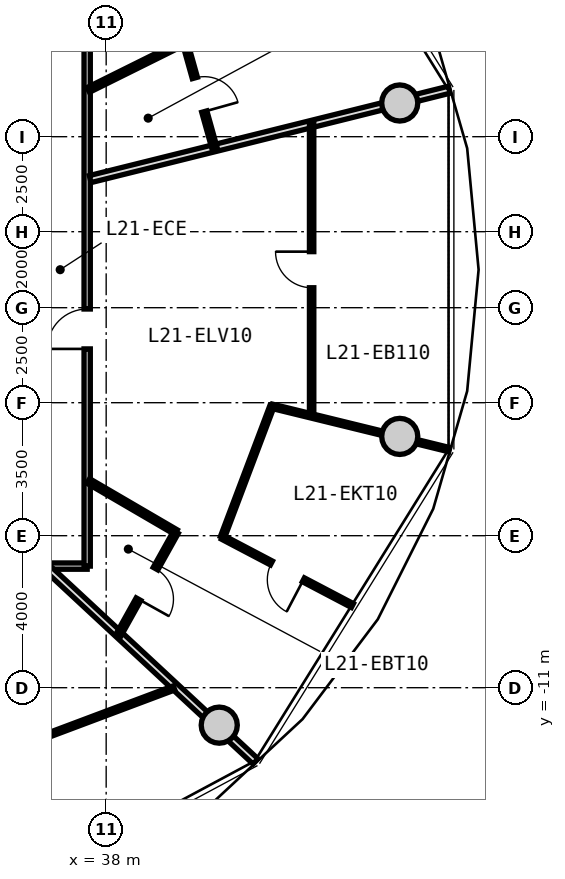
"""IFC4 building model, lengths in metres.
Left out: names, types, materials, properties, quantities, classifications, styles, units other than length and angle.
Written with IfcOpenShell. Run it as: python <this file> out.ifc"""

import sys

from ifc_helpers import new_model, si_unit, direction, frame, frame_2d, origin, origin_2d, place, context, subcontext, project, spatial, rectangle, circle, extrude, source, transform, mapped, element, fill, save


model = new_model("IFC4")
c1 = context("Model", 3, precision=1e-05, world=origin(), true_north=direction((0.0, 1.0)))
c2 = subcontext(c1, "Body", "Model", "MODEL_VIEW")
j1 = project(units=[si_unit("LENGTHUNIT", "METRE"), si_unit("PLANEANGLEUNIT", "RADIAN")], contexts=[c1])
p1 = place(None, origin())
s1 = spatial("IfcSite", under=j1, at=p1, CompositionType="ELEMENT")
p2 = place(p1, origin())
s2 = spatial("IfcBuilding", under=s1, at=p2, CompositionType="ELEMENT")
p3 = place(p2, frame((0.0, 0.0, 70.4)))
s3 = spatial("IfcBuildingStorey", under=s2, at=p3, CompositionType="ELEMENT", Elevation=70.4)
m1 = source(origin(), c2, "Body", "SweptSolid", [
    extrude(circle(Radius=0.475, at=origin_2d()), origin(), (0.0, 0.0, 1.0), 3.05),
])
for number, where, z_axis, x_axis in (
    (1, (45.725, 4.387, 0.0), (0.0, 0.0, 1.0), (1.0, 0.0, 0.0)),
    (2, (40.975, -11.985, 0.0), (0.0, 0.0, 1.0), (1.0, 0.0, 0.0)),
    (3, (45.725, -4.387, 0.0), (0.0, 0.0, 1.0), (1.0, 0.0, 0.0)),
):
    element("IfcColumn", number, at=place(p3, frame(where, z_axis=z_axis, x_axis=x_axis)), inside=s3, PredefinedType="COLUMN", context=c2, shape_type="MappedRepresentation", body=[
        mapped(m1, transform((0.0, 0.0, 0.0), x_axis=(1.0, 0.0, 0.0), y_axis=(0.0, 1.0, 0.0), z_axis=(0.0, 0.0, 1.0), scale=1.0)),
    ])
m2 = source(origin(), c2, "Body", "SweptSolid", [
    extrude(rectangle(XDim=19.0, YDim=0.165, at=frame_2d((9.5, 0.0))), origin(), (0.0, 0.0, 1.0), 2.715),
])
p4 = place(p3, frame((37.5, -7.8, 0.0), z_axis=(0.0, 0.0, 1.0), x_axis=(-1.0, 0.0, 0.0)))
e4 = element("IfcWall", 4, at=p4, inside=s3, PredefinedType="PARTITIONING", context=c2, shape_type="MappedRepresentation", body=[
    mapped(m2, transform((0.0, 0.0, 0.0), x_axis=(1.0, 0.0, 0.0), y_axis=(0.0, 1.0, 0.0), z_axis=(0.0, 0.0, 1.0), scale=1.0)),
])
p5 = place(p4, frame((14.72, 0.0, 0.0)))
e5 = element("IfcOpeningElement", 5, at=p5, cuts=e4, PredefinedType="OPENING", context=c2, shape_type="SweptSolid", body=[
    extrude(rectangle(XDim=1.05, YDim=2.15, at=frame_2d((0.525, 1.075))), frame((0.0, 0.093, 0.0), z_axis=(0.0, -1.0, 0.0), x_axis=(1.0, 0.0, 0.0)), (0.0, 0.0, 1.0), 0.185),
])
p6 = place(p4, frame((4.847, 0.0, 0.0)))
e6 = element("IfcOpeningElement", 6, at=p6, cuts=e4, PredefinedType="OPENING", context=c2, shape_type="SweptSolid", body=[
    extrude(rectangle(XDim=1.05, YDim=2.15, at=frame_2d((0.525, 1.075))), frame((0.0, 0.093, 0.0), z_axis=(0.0, -1.0, 0.0), x_axis=(1.0, 0.0, 0.0)), (0.0, 0.0, 1.0), 0.185),
])
m3 = source(origin(), c2, "Body", "SweptSolid", [
    extrude(rectangle(XDim=15.6, YDim=0.165, at=frame_2d((7.8, 0.0))), origin(), (0.0, 0.0, 1.0), 2.715),
])
p7 = place(p3, frame((37.5, 7.8, 0.0), z_axis=(0.0, 0.0, 1.0), x_axis=(0.0, -1.0, 0.0)))
e7 = element("IfcWall", 7, at=p7, inside=s3, PredefinedType="PARTITIONING", context=c2, shape_type="MappedRepresentation", body=[
    mapped(m3, transform((0.0, 0.0, 0.0), x_axis=(1.0, 0.0, 0.0), y_axis=(0.0, 1.0, 0.0), z_axis=(0.0, 0.0, 1.0), scale=1.0)),
])
p8 = place(p7, frame((8.835, 0.0, 0.0)))
e8 = element("IfcOpeningElement", 8, at=p8, cuts=e7, PredefinedType="OPENING", context=c2, shape_type="SweptSolid", body=[
    extrude(rectangle(XDim=1.05, YDim=2.15, at=frame_2d((0.525, 1.075))), frame((0.0, 0.093, 0.0), z_axis=(0.0, -1.0, 0.0), x_axis=(1.0, 0.0, 0.0)), (0.0, 0.0, 1.0), 0.185),
])
m4 = source(origin(), c2, "Body", "SweptSolid", [
    extrude(rectangle(XDim=7.435, YDim=0.19, at=frame_2d((3.717, 0.0))), origin(), (0.0, 0.0, 1.0), 2.165),
])
p9 = place(p3, frame((36.483, -7.88, 0.0), z_axis=(0.0, 0.0, 1.0), x_axis=(0.732651956848, -0.680603489652, 0.0)))
e9 = element("IfcWall", 9, at=p9, inside=s3, PredefinedType="PARTITIONING", context=c2, shape_type="MappedRepresentation", body=[
    mapped(m4, transform((0.0, 0.0, 0.0), x_axis=(1.0, 0.0, 0.0), y_axis=(0.0, 1.0, 0.0), z_axis=(0.0, 0.0, 1.0), scale=1.0)),
])
m5 = source(origin(), c2, "Body", "SweptSolid", [
    extrude(rectangle(XDim=8.32, YDim=0.115, at=frame_2d((4.16, 0.0))), origin(), (0.0, 0.0, 1.0), 2.715),
])
p10 = place(p3, frame((31.997, -13.93, 0.0), z_axis=(0.0, 0.0, 1.0), x_axis=(0.936180763098, 0.351518959382, 0.0)))
e10 = element("IfcWall", 10, at=p10, inside=s3, PredefinedType="PARTITIONING", context=c2, shape_type="MappedRepresentation", body=[
    mapped(m5, transform((0.0, 0.0, 0.0), x_axis=(1.0, 0.0, 0.0), y_axis=(0.0, 1.0, 0.0), z_axis=(0.0, 0.0, 1.0), scale=1.0)),
])
p11 = place(p10, frame((3.685, 0.0, 0.0)))
e11 = element("IfcOpeningElement", 11, at=p11, cuts=e10, PredefinedType="OPENING", context=c2, shape_type="SweptSolid", body=[
    extrude(rectangle(XDim=0.95, YDim=2.1, at=frame_2d((0.475, 1.05))), frame((0.0, 0.067, 0.0), z_axis=(0.0, -1.0, 0.0), x_axis=(1.0, 0.0, 0.0)), (0.0, 0.0, 1.0), 0.135),
])
m6 = source(origin(), c2, "Body", "SweptSolid", [
    extrude(rectangle(XDim=9.737, YDim=0.19, at=frame_2d((4.869, 0.0))), origin(), (0.0, 0.0, 1.0), 2.165),
])
p12 = place(p3, frame((37.58, 2.385, 0.0), z_axis=(0.0, 0.0, 1.0), x_axis=(0.970392716238, 0.241532557375, 0.0)))
e12 = element("IfcWall", 12, at=p12, inside=s3, PredefinedType="PARTITIONING", context=c2, shape_type="MappedRepresentation", body=[
    mapped(m6, transform((0.0, 0.0, 0.0), x_axis=(1.0, 0.0, 0.0), y_axis=(0.0, 1.0, 0.0), z_axis=(0.0, 0.0, 1.0), scale=1.0)),
])
m7 = source(origin(), c2, "Body", "SweptSolid", [
    extrude(rectangle(XDim=7.709, YDim=0.115, at=frame_2d((3.855, 0.0))), origin(), (0.0, 0.0, 1.0), 2.715),
])
p13 = place(p3, frame((43.406, -3.855, 0.0), z_axis=(0.0, 0.0, 1.0), x_axis=(0.0, 1.0, 0.0)))
e13 = element("IfcWall", 13, at=p13, inside=s3, PredefinedType="PARTITIONING", context=c2, shape_type="MappedRepresentation", body=[
    mapped(m7, transform((0.0, 0.0, 0.0), x_axis=(1.0, 0.0, 0.0), y_axis=(0.0, 1.0, 0.0), z_axis=(0.0, 0.0, 1.0), scale=1.0)),
])
p14 = place(p13, frame((3.38, 0.0, 0.0)))
e14 = element("IfcOpeningElement", 14, at=p14, cuts=e13, PredefinedType="OPENING", context=c2, shape_type="SweptSolid", body=[
    extrude(rectangle(XDim=0.95, YDim=2.1, at=frame_2d((0.475, 1.05))), frame((0.0, 0.067, 0.0), z_axis=(0.0, -1.0, 0.0), x_axis=(1.0, 0.0, 0.0)), (0.0, 0.0, 1.0), 0.135),
])
m8 = source(origin(), c2, "Body", "SweptSolid", [
    extrude(rectangle(XDim=4.803, YDim=0.115, at=frame_2d((2.401, 0.0))), origin(), (0.0, 0.0, 1.0), 2.165),
])
p15 = place(p3, frame((42.364, -3.594, 0.0), z_axis=(0.0, 0.0, 1.0), x_axis=(0.97129155908, -0.237892217736, 0.0)))
e15 = element("IfcWall", 15, at=p15, inside=s3, PredefinedType="PARTITIONING", context=c2, shape_type="MappedRepresentation", body=[
    mapped(m8, transform((0.0, 0.0, 0.0), x_axis=(1.0, 0.0, 0.0), y_axis=(0.0, 1.0, 0.0), z_axis=(0.0, 0.0, 1.0), scale=1.0)),
])
m9 = source(origin(), c2, "Body", "SweptSolid", [
    extrude(rectangle(XDim=2.669, YDim=0.14, at=frame_2d((1.335, 0.0))), origin(), (0.0, 0.0, 1.0), 2.715),
])
p16 = place(p3, frame((37.53, -5.561, 0.0), z_axis=(0.0, 0.0, 1.0), x_axis=(0.86369928178, -0.50400749067, 0.0)))
e16 = element("IfcWall", 16, at=p16, inside=s3, PredefinedType="PARTITIONING", context=c2, shape_type="MappedRepresentation", body=[
    mapped(m9, transform((0.0, 0.0, 0.0), x_axis=(1.0, 0.0, 0.0), y_axis=(0.0, 1.0, 0.0), z_axis=(0.0, 0.0, 1.0), scale=1.0)),
])
m10 = source(origin(), c2, "Body", "SweptSolid", [
    extrude(rectangle(XDim=3.121, YDim=0.14, at=frame_2d((1.561, 0.0))), origin(), (0.0, 0.0, 1.0), 2.715),
])
p17 = place(p3, frame((39.836, -6.906, 0.0), z_axis=(0.0, 0.0, 1.0), x_axis=(-0.487302357327, -0.873233309342, 0.0)))
e17 = element("IfcWall", 17, at=p17, inside=s3, PredefinedType="PARTITIONING", context=c2, shape_type="MappedRepresentation", body=[
    mapped(m10, transform((0.0, 0.0, 0.0), x_axis=(1.0, 0.0, 0.0), y_axis=(0.0, 1.0, 0.0), z_axis=(0.0, 0.0, 1.0), scale=1.0)),
])
p18 = place(p17, frame((1.101, 0.0, 0.0)))
e18 = element("IfcOpeningElement", 18, at=p18, cuts=e17, PredefinedType="OPENING", context=c2, shape_type="SweptSolid", body=[
    extrude(rectangle(XDim=0.92, YDim=2.1, at=frame_2d((0.46, 1.05))), frame((0.0, 0.08, 0.0), z_axis=(0.0, -1.0, 0.0), x_axis=(1.0, 0.0, 0.0)), (0.0, 0.0, 1.0), 0.16),
])
m11 = source(origin(), c2, "Body", "SweptSolid", [
    extrude(rectangle(XDim=3.864, YDim=0.115, at=frame_2d((1.932, 0.0))), origin(), (0.0, 0.0, 1.0), 2.715),
])
p19 = place(p3, frame((41.06, -7.041, 0.0), z_axis=(0.0, 0.0, 1.0), x_axis=(0.885194959803, -0.465220252289, 0.0)))
e19 = element("IfcWall", 19, at=p19, inside=s3, PredefinedType="PARTITIONING", context=c2, shape_type="MappedRepresentation", body=[
    mapped(m11, transform((0.0, 0.0, 0.0), x_axis=(1.0, 0.0, 0.0), y_axis=(0.0, 1.0, 0.0), z_axis=(0.0, 0.0, 1.0), scale=1.0)),
])
p20 = place(p19, frame((1.457, 0.0, 0.0)))
e20 = element("IfcOpeningElement", 20, at=p20, cuts=e19, PredefinedType="OPENING", context=c2, shape_type="SweptSolid", body=[
    extrude(rectangle(XDim=0.95, YDim=2.1, at=frame_2d((0.475, 1.05))), frame((0.0, 0.067, 0.0), z_axis=(0.0, -1.0, 0.0), x_axis=(1.0, 0.0, 0.0)), (0.0, 0.0, 1.0), 0.135),
])
m12 = source(origin(), c2, "Body", "SweptSolid", [
    extrude(rectangle(XDim=3.685, YDim=0.115, at=frame_2d((1.843, 0.0))), origin(), (0.0, 0.0, 1.0), 2.715),
])
p21 = place(p3, frame((41.06, -7.041, 0.0), z_axis=(0.0, 0.0, 1.0), x_axis=(0.353503632997, 0.935433151785, 0.0)))
e21 = element("IfcWall", 21, at=p21, inside=s3, PredefinedType="PARTITIONING", context=c2, shape_type="MappedRepresentation", body=[
    mapped(m12, transform((0.0, 0.0, 0.0), x_axis=(1.0, 0.0, 0.0), y_axis=(0.0, 1.0, 0.0), z_axis=(0.0, 0.0, 1.0), scale=1.0)),
])
m13 = source(origin(), c2, "Body", "SweptSolid", [
    extrude(rectangle(XDim=2.834, YDim=0.14, at=frame_2d((1.417, 0.0))), origin(), (0.0, 0.0, 1.0), 2.715),
])
p22 = place(p3, frame((37.53, 4.732, 0.0), z_axis=(0.0, 0.0, 1.0), x_axis=(0.895681174462, 0.444696788513, 0.0)))
e22 = element("IfcWall", 22, at=p22, inside=s3, PredefinedType="PARTITIONING", context=c2, shape_type="MappedRepresentation", body=[
    mapped(m13, transform((0.0, 0.0, 0.0), x_axis=(1.0, 0.0, 0.0), y_axis=(0.0, 1.0, 0.0), z_axis=(0.0, 0.0, 1.0), scale=1.0)),
])
m14 = source(origin(), c2, "Body", "SweptSolid", [
    extrude(rectangle(XDim=2.885, YDim=0.14, at=frame_2d((1.442, 0.0))), origin(), (0.0, 0.0, 1.0), 2.715),
])
p23 = place(p3, frame((40.069, 5.992, 0.0), z_axis=(0.0, 0.0, 1.0), x_axis=(0.269799431837, -0.962916541856, 0.0)))
e23 = element("IfcWall", 23, at=p23, inside=s3, PredefinedType="PARTITIONING", context=c2, shape_type="MappedRepresentation", body=[
    mapped(m14, transform((0.0, 0.0, 0.0), x_axis=(1.0, 0.0, 0.0), y_axis=(0.0, 1.0, 0.0), z_axis=(0.0, 0.0, 1.0), scale=1.0)),
])
p24 = place(p23, frame((0.982, 0.0, 0.0)))
e24 = element("IfcOpeningElement", 24, at=p24, cuts=e23, PredefinedType="OPENING", context=c2, shape_type="SweptSolid", body=[
    extrude(rectangle(XDim=0.92, YDim=2.1, at=frame_2d((0.46, 1.05))), frame((0.0, 0.08, 0.0), z_axis=(0.0, -1.0, 0.0), x_axis=(1.0, 0.0, 0.0)), (0.0, 0.0, 1.0), 0.16),
])
m15 = source(origin(), c2, "Body", "SweptSolid", [
    extrude(rectangle(XDim=1.05, YDim=2.15, at=frame_2d((0.525, 1.075))), frame((0.0, 0.025, 0.0), z_axis=(0.0, -1.0, 0.0), x_axis=(1.0, 0.0, 0.0)), (0.0, 0.0, 1.0), 0.05),
])
p25 = place(p8, frame((1.05, 0.0, 0.0), z_axis=(0.0, 0.0, 1.0), x_axis=(-1.0, 0.0, 0.0)))
e25 = element("IfcDoor", 25, at=p25, inside=s3, OperationType="SINGLE_SWING_LEFT", PredefinedType="DOOR", context=c2, shape_type="MappedRepresentation", body=[
    mapped(m15, transform((0.0, 0.0, 0.0), x_axis=(1.0, 0.0, 0.0), y_axis=(0.0, 1.0, 0.0), z_axis=(0.0, 0.0, 1.0), scale=1.0)),
])
fill(e8, e25)
m16 = source(origin(), c2, "Body", "SweptSolid", [
    extrude(rectangle(XDim=0.92, YDim=2.1, at=frame_2d((0.46, 1.05))), frame((0.0, 0.025, 0.0), z_axis=(0.0, -1.0, 0.0), x_axis=(1.0, 0.0, 0.0)), (0.0, 0.0, 1.0), 0.05),
])
p26 = place(p18, origin())
e26 = element("IfcDoor", 26, at=p26, inside=s3, OperationType="SINGLE_SWING_RIGHT", PredefinedType="DOOR", context=c2, shape_type="MappedRepresentation", body=[
    mapped(m16, transform((0.0, 0.0, 0.0), x_axis=(1.0, 0.0, 0.0), y_axis=(0.0, 1.0, 0.0), z_axis=(0.0, 0.0, 1.0), scale=1.0)),
])
fill(e18, e26)
m17 = source(origin(), c2, "Body", "SweptSolid", [
    extrude(rectangle(XDim=0.95, YDim=2.1, at=frame_2d((0.475, 1.05))), frame((0.0, 0.025, 0.0), z_axis=(0.0, -1.0, 0.0), x_axis=(1.0, 0.0, 0.0)), (0.0, 0.0, 1.0), 0.05),
])
p27 = place(p20, frame((0.95, 0.0, 0.0), z_axis=(0.0, 0.0, 1.0), x_axis=(-1.0, 0.0, 0.0)))
e27 = element("IfcDoor", 27, at=p27, inside=s3, OperationType="SINGLE_SWING_LEFT", PredefinedType="DOOR", context=c2, shape_type="MappedRepresentation", body=[
    mapped(m17, transform((0.0, 0.0, 0.0), x_axis=(1.0, 0.0, 0.0), y_axis=(0.0, 1.0, 0.0), z_axis=(0.0, 0.0, 1.0), scale=1.0)),
])
fill(e20, e27)
p28 = place(p14, origin())
e28 = element("IfcDoor", 28, at=p28, inside=s3, OperationType="SINGLE_SWING_RIGHT", PredefinedType="DOOR", context=c2, shape_type="MappedRepresentation", body=[
    mapped(m17, transform((0.0, 0.0, 0.0), x_axis=(1.0, 0.0, 0.0), y_axis=(0.0, 1.0, 0.0), z_axis=(0.0, 0.0, 1.0), scale=1.0)),
])
fill(e14, e28)
p29 = place(p24, origin())
e29 = element("IfcDoor", 29, at=p29, inside=s3, OperationType="SINGLE_SWING_RIGHT", PredefinedType="DOOR", context=c2, shape_type="MappedRepresentation", body=[
    mapped(m16, transform((0.0, 0.0, 0.0), x_axis=(1.0, 0.0, 0.0), y_axis=(0.0, 1.0, 0.0), z_axis=(0.0, 0.0, 1.0), scale=1.0)),
])
fill(e24, e29)
save(model, sys.argv[1])
